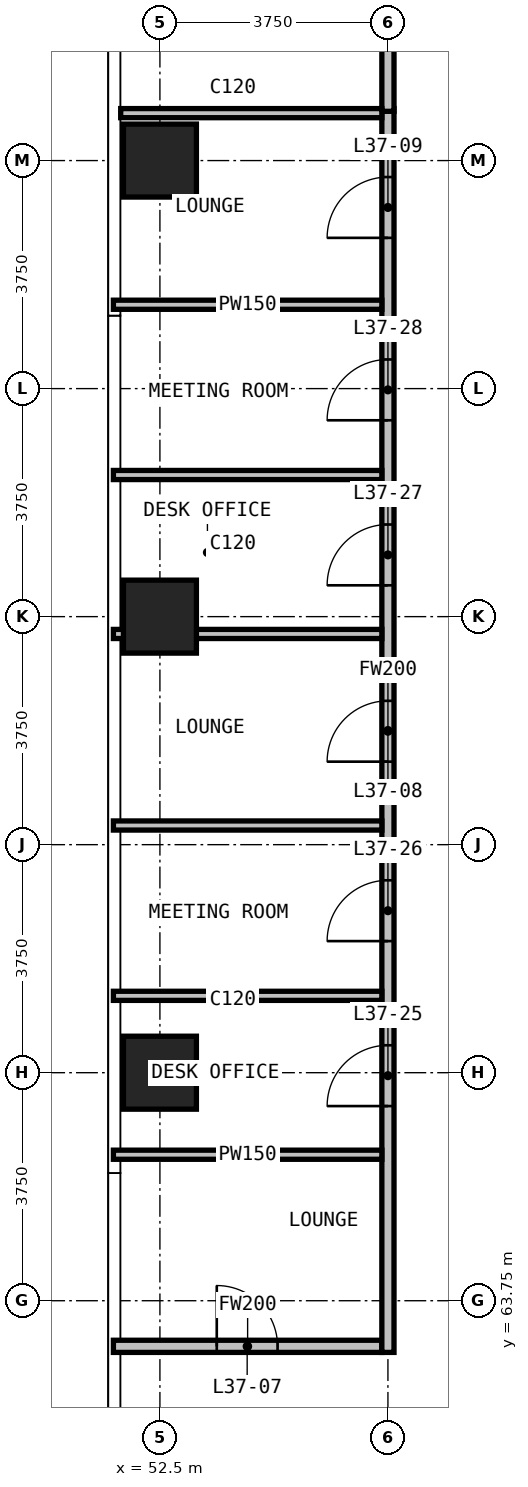
"""IFC4 building model, lengths in metres.
Left out: names, types, materials, properties, quantities, classifications, styles, units other than length and angle.
Written with IfcOpenShell. Run it as: python <this file> out.ifc"""

import sys

from ifc_helpers import new_model, si_unit, direction, frame, frame_2d, origin, origin_2d, place, context, subcontext, project, spatial, rectangle, extrude, element, fill, save


model = new_model("IFC4")
c1 = context("Model", 3, precision=1e-05, world=origin(), true_north=direction((0.0, 1.0)))
c2 = subcontext(c1, "Body", "Model", "MODEL_VIEW")
j1 = project(units=[si_unit("LENGTHUNIT", "METRE"), si_unit("PLANEANGLEUNIT", "RADIAN")], contexts=[c1])
p1 = place(None, origin())
s1 = spatial("IfcSite", under=j1, at=p1, CompositionType="ELEMENT")
p2 = place(p1, origin())
s2 = spatial("IfcBuilding", under=s1, at=p2, CompositionType="ELEMENT")
p3 = place(p2, frame((0.0, 0.0, 147.7)))
s3 = spatial("IfcBuildingStorey", under=s2, at=p3, CompositionType="ELEMENT", Elevation=147.7)
for number, where, z_axis, x_axis in (
    (1, (52.5, 67.5, 0.0), (0.0, 0.0, 1.0), (1.0, 0.0, 0.0)),
    (2, (52.5, 75.0, 0.0), (0.0, 0.0, 1.0), (1.0, 0.0, 0.0)),
    (3, (52.5, 82.5, 0.0), (0.0, 0.0, 1.0), (1.0, 0.0, 0.0)),
):
    element("IfcColumn", number, at=place(p3, frame(where, z_axis=z_axis, x_axis=x_axis)), inside=s3, PredefinedType="COLUMN", context=c2, shape_type="SweptSolid", body=[
        extrude(rectangle(XDim=1.2, YDim=1.2, at=origin_2d()), origin(), (0.0, 0.0, 1.0), 3.6),
    ])
p4 = place(p3, frame((51.735, 63.0, 0.0), z_axis=(0.0, 0.0, 1.0), x_axis=(1.0, 0.0, 0.0)))
e4 = element("IfcWall", 4, at=p4, inside=s3, PredefinedType="PARTITIONING", context=c2, shape_type="SweptSolid", body=[
    extrude(rectangle(XDim=4.415, YDim=0.2, at=frame_2d((2.208, 0.0))), origin(), (0.0, 0.0, 1.0), 3.3),
])
p5 = place(p4, frame((1.7, 0.0, 0.0)))
e5 = element("IfcOpeningElement", 5, at=p5, cuts=e4, PredefinedType="OPENING", context=c2, shape_type="SweptSolid", body=[
    extrude(rectangle(XDim=1.0, YDim=2.2, at=frame_2d((0.5, 1.1))), frame((0.0, 0.11, 0.0), z_axis=(0.0, -1.0, 0.0), x_axis=(1.0, 0.0, 0.0)), (0.0, 0.0, 1.0), 0.22),
])
p6 = place(p3, frame((56.25, 62.9, 0.0), z_axis=(0.0, 0.0, 1.0), x_axis=(0.0, 1.0, 0.0)))
e6 = element("IfcWall", 6, at=p6, inside=s3, PredefinedType="PARTITIONING", context=c2, shape_type="SweptSolid", body=[
    extrude(rectangle(XDim=20.455, YDim=0.2, at=frame_2d((10.228, 0.0))), origin(), (0.0, 0.0, 1.0), 3.3),
])
p7 = place(p6, frame((9.715, 0.0, 0.0)))
e7 = element("IfcOpeningElement", 7, at=p7, cuts=e6, PredefinedType="OPENING", context=c2, shape_type="SweptSolid", body=[
    extrude(rectangle(XDim=1.0, YDim=2.2, at=frame_2d((0.5, 1.1))), frame((0.0, 0.11, 0.0), z_axis=(0.0, -1.0, 0.0), x_axis=(1.0, 0.0, 0.0)), (0.0, 0.0, 1.0), 0.22),
])
p8 = place(p6, frame((18.329, 0.0, 0.0)))
e8 = element("IfcOpeningElement", 8, at=p8, cuts=e6, PredefinedType="OPENING", context=c2, shape_type="SweptSolid", body=[
    extrude(rectangle(XDim=1.0, YDim=2.2, at=frame_2d((0.5, 1.1))), frame((0.0, 0.11, 0.0), z_axis=(0.0, -1.0, 0.0), x_axis=(1.0, 0.0, 0.0)), (0.0, 0.0, 1.0), 0.22),
])
p9 = place(p6, frame((4.051, 0.0, 0.0)))
e9 = element("IfcOpeningElement", 9, at=p9, cuts=e6, PredefinedType="OPENING", context=c2, shape_type="SweptSolid", body=[
    extrude(rectangle(XDim=1.0, YDim=2.2, at=frame_2d((0.5, 1.1))), frame((0.0, 0.11, 0.0), z_axis=(0.0, -1.0, 0.0), x_axis=(1.0, 0.0, 0.0)), (0.0, 0.0, 1.0), 0.22),
])
p10 = place(p6, frame((6.764, 0.0, 0.0)))
e10 = element("IfcOpeningElement", 10, at=p10, cuts=e6, PredefinedType="OPENING", context=c2, shape_type="SweptSolid", body=[
    extrude(rectangle(XDim=1.0, YDim=2.2, at=frame_2d((0.5, 1.1))), frame((0.0, 0.11, 0.0), z_axis=(0.0, -1.0, 0.0), x_axis=(1.0, 0.0, 0.0)), (0.0, 0.0, 1.0), 0.22),
])
p11 = place(p6, frame((12.615, 0.0, 0.0)))
e11 = element("IfcOpeningElement", 11, at=p11, cuts=e6, PredefinedType="OPENING", context=c2, shape_type="SweptSolid", body=[
    extrude(rectangle(XDim=1.0, YDim=2.2, at=frame_2d((0.5, 1.1))), frame((0.0, 0.11, 0.0), z_axis=(0.0, -1.0, 0.0), x_axis=(1.0, 0.0, 0.0)), (0.0, 0.0, 1.0), 0.22),
])
p12 = place(p6, frame((15.329, 0.0, 0.0)))
e12 = element("IfcOpeningElement", 12, at=p12, cuts=e6, PredefinedType="OPENING", context=c2, shape_type="SweptSolid", body=[
    extrude(rectangle(XDim=1.0, YDim=2.2, at=frame_2d((0.5, 1.1))), frame((0.0, 0.11, 0.0), z_axis=(0.0, -1.0, 0.0), x_axis=(1.0, 0.0, 0.0)), (0.0, 0.0, 1.0), 0.22),
])
p13 = place(p3, frame((56.25, 83.31, 0.0), z_axis=(0.0, 0.0, 1.0), x_axis=(0.0, 1.0, 0.0)))
e13 = element("IfcWall", 13, at=p13, inside=s3, PredefinedType="PARTITIONING", context=c2, shape_type="SweptSolid", body=[
    extrude(rectangle(XDim=7.335, YDim=0.2, at=frame_2d((3.667, 0.0))), origin(), (0.0, 0.0, 1.0), 3.3),
])
for number, where, z_axis, x_axis in (
    (14, (51.735, 66.151, 0.0), (0.0, 0.0, 1.0), (1.0, 0.0, 0.0)),
    (15, (51.735, 68.764, 0.0), (0.0, 0.0, 1.0), (1.0, 0.0, 0.0)),
    (16, (51.735, 71.565, 0.0), (0.0, 0.0, 1.0), (1.0, 0.0, 0.0)),
    (17, (51.735, 74.715, 0.0), (0.0, 0.0, 1.0), (1.0, 0.0, 0.0)),
    (18, (51.735, 77.329, 0.0), (0.0, 0.0, 1.0), (1.0, 0.0, 0.0)),
    (19, (51.735, 80.129, 0.0), (0.0, 0.0, 1.0), (1.0, 0.0, 0.0)),
):
    element("IfcWall", number, at=place(p3, frame(where, z_axis=z_axis, x_axis=x_axis)), inside=s3, PredefinedType="PARTITIONING", context=c2, shape_type="SweptSolid", body=[
        extrude(rectangle(XDim=4.415, YDim=0.15, at=frame_2d((2.208, 0.0))), origin(), (0.0, 0.0, 1.0), 3.3),
    ])
p14 = place(p3, frame((51.855, 83.28, 0.0), z_axis=(0.0, 0.0, 1.0), x_axis=(1.0, 0.0, 0.0)))
e20 = element("IfcWall", 20, at=p14, inside=s3, PredefinedType="PARTITIONING", context=c2, shape_type="SweptSolid", body=[
    extrude(rectangle(XDim=4.295, YDim=0.15, at=frame_2d((2.147, 0.0))), origin(), (0.0, 0.0, 1.0), 3.3),
])
p15 = place(p5, origin())
e21 = element("IfcDoor", 21, at=p15, inside=s3, OperationType="SINGLE_SWING_LEFT", PredefinedType="DOOR", context=c2, shape_type="SweptSolid", body=[
    extrude(rectangle(XDim=1.0, YDim=2.2, at=frame_2d((0.5, 1.1))), frame((0.0, 0.025, 0.0), z_axis=(0.0, -1.0, 0.0), x_axis=(1.0, 0.0, 0.0)), (0.0, 0.0, 1.0), 0.05),
])
fill(e5, e21)
p16 = place(p7, origin())
e22 = element("IfcDoor", 22, at=p16, inside=s3, OperationType="SINGLE_SWING_LEFT", PredefinedType="DOOR", context=c2, shape_type="SweptSolid", body=[
    extrude(rectangle(XDim=1.0, YDim=2.2, at=frame_2d((0.5, 1.1))), frame((0.0, 0.025, 0.0), z_axis=(0.0, -1.0, 0.0), x_axis=(1.0, 0.0, 0.0)), (0.0, 0.0, 1.0), 0.05),
])
fill(e7, e22)
p17 = place(p8, origin())
e23 = element("IfcDoor", 23, at=p17, inside=s3, OperationType="SINGLE_SWING_RIGHT", PredefinedType="DOOR", context=c2, shape_type="SweptSolid", body=[
    extrude(rectangle(XDim=1.0, YDim=2.2, at=frame_2d((0.5, 1.1))), frame((0.0, 0.025, 0.0), z_axis=(0.0, -1.0, 0.0), x_axis=(1.0, 0.0, 0.0)), (0.0, 0.0, 1.0), 0.05),
])
fill(e8, e23)
p18 = place(p9, origin())
e24 = element("IfcDoor", 24, at=p18, inside=s3, OperationType="SINGLE_SWING_RIGHT", PredefinedType="DOOR", context=c2, shape_type="SweptSolid", body=[
    extrude(rectangle(XDim=1.0, YDim=2.2, at=frame_2d((0.5, 1.1))), frame((0.0, 0.025, 0.0), z_axis=(0.0, -1.0, 0.0), x_axis=(1.0, 0.0, 0.0)), (0.0, 0.0, 1.0), 0.05),
])
fill(e9, e24)
p19 = place(p10, origin())
e25 = element("IfcDoor", 25, at=p19, inside=s3, OperationType="SINGLE_SWING_LEFT", PredefinedType="DOOR", context=c2, shape_type="SweptSolid", body=[
    extrude(rectangle(XDim=1.0, YDim=2.2, at=frame_2d((0.5, 1.1))), frame((0.0, 0.025, 0.0), z_axis=(0.0, -1.0, 0.0), x_axis=(1.0, 0.0, 0.0)), (0.0, 0.0, 1.0), 0.05),
])
fill(e10, e25)
p20 = place(p11, origin())
e26 = element("IfcDoor", 26, at=p20, inside=s3, OperationType="SINGLE_SWING_RIGHT", PredefinedType="DOOR", context=c2, shape_type="SweptSolid", body=[
    extrude(rectangle(XDim=1.0, YDim=2.2, at=frame_2d((0.5, 1.1))), frame((0.0, 0.025, 0.0), z_axis=(0.0, -1.0, 0.0), x_axis=(1.0, 0.0, 0.0)), (0.0, 0.0, 1.0), 0.05),
])
fill(e11, e26)
p21 = place(p12, origin())
e27 = element("IfcDoor", 27, at=p21, inside=s3, OperationType="SINGLE_SWING_LEFT", PredefinedType="DOOR", context=c2, shape_type="SweptSolid", body=[
    extrude(rectangle(XDim=1.0, YDim=2.2, at=frame_2d((0.5, 1.1))), frame((0.0, 0.025, 0.0), z_axis=(0.0, -1.0, 0.0), x_axis=(1.0, 0.0, 0.0)), (0.0, 0.0, 1.0), 0.05),
])
fill(e12, e27)
save(model, sys.argv[1])
